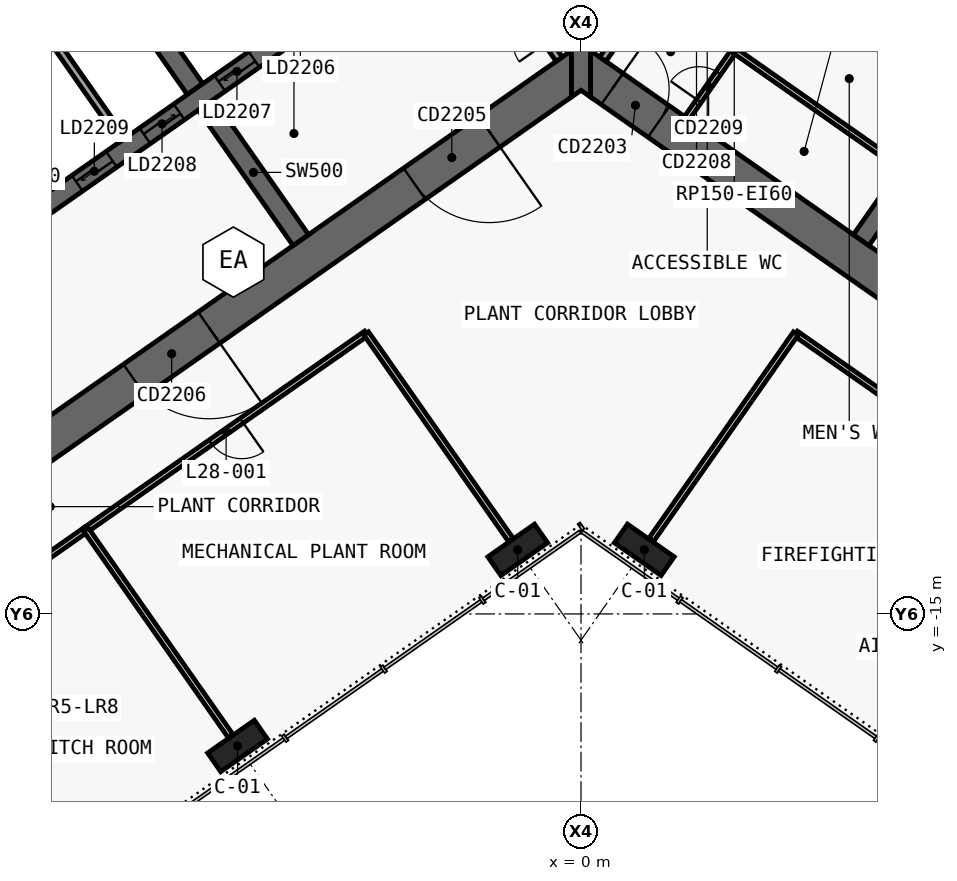
"""IFC4 building model, lengths in metres.
Left out: names, types, materials, properties, quantities, classifications, styles, units other than length and angle.
Written with IfcOpenShell. Run it as: python <this file> out.ifc"""

import sys

from ifc_helpers import new_model, si_unit, direction, frame, frame_2d, origin, origin_2d, place, context, subcontext, project, spatial, polyline, rectangle, outline, extrude, element, fill, save


model = new_model("IFC4")
c1 = context("Model", 3, precision=1e-05, world=origin(), true_north=direction((0.0, 1.0)))
c2 = subcontext(c1, "Body", "Model", "MODEL_VIEW")
j1 = project(units=[si_unit("LENGTHUNIT", "METRE"), si_unit("PLANEANGLEUNIT", "RADIAN")], contexts=[c1])
p1 = place(None, origin())
s1 = spatial("IfcSite", under=j1, at=p1, CompositionType="ELEMENT")
p2 = place(p1, origin())
s2 = spatial("IfcBuilding", under=s1, at=p2, CompositionType="ELEMENT")
p3 = place(p2, frame((0.0, 0.0, 126.5)))
s3 = spatial("IfcBuildingStorey", under=s2, at=p3, CompositionType="ELEMENT", Elevation=126.5)
p4 = place(p3, frame((0.037, 11.867, 0.0), z_axis=(0.0, 0.0, 1.0), x_axis=(-0.819155306259, -0.573571777746, 0.0)))
e1 = element("IfcWall", 1, at=p4, inside=s3, PredefinedType="SHEAR", context=c2, shape_type="SweptSolid", body=[
    extrude(outline(polyline([(33.837, 0.5), (0.7, 0.5), (0.0, -0.5), (33.837, -0.5), (33.837, 0.5)])), origin(), (0.0, 0.0, 1.0), 5.5),
])
p5 = place(p3, frame((0.037, -0.585, 0.0), z_axis=(0.0, 0.0, 1.0), x_axis=(-0.819157152511, -0.573569140985, 0.0)))
e2 = element("IfcWall", 2, at=p5, inside=s3, PredefinedType="SHEAR", context=c2, shape_type="SweptSolid", body=[
    extrude(outline(polyline([(26.695, 0.5), (0.7, 0.5), (0.0, -0.5), (26.695, -0.5), (26.695, 0.5)])), origin(), (0.0, 0.0, 1.0), 5.5),
])
p6 = place(p5, frame((2.995, 0.0, 0.0)))
e3 = element("IfcOpeningElement", 3, at=p6, cuts=e2, PredefinedType="OPENING", context=c2, shape_type="SweptSolid", body=[
    extrude(rectangle(XDim=2.4, YDim=2.1, at=frame_2d((1.2, 1.05))), frame((0.0, 0.51, 0.0), z_axis=(0.0, -1.0, 0.0), x_axis=(1.0, 0.0, 0.0)), (0.0, 0.0, 1.0), 1.02),
])
p7 = place(p5, frame((11.995, 0.0, 0.0)))
e4 = element("IfcOpeningElement", 4, at=p7, cuts=e2, PredefinedType="OPENING", context=c2, shape_type="SweptSolid", body=[
    extrude(rectangle(XDim=2.4, YDim=2.1, at=frame_2d((1.2, 1.05))), frame((0.0, 0.51, 0.0), z_axis=(0.0, -1.0, 0.0), x_axis=(1.0, 0.0, 0.0)), (0.0, 0.0, 1.0), 1.02),
])
p8 = place(p3, frame((-7.372, -5.162, 0.0), z_axis=(0.0, 0.0, 1.0), x_axis=(-0.573594173421, 0.819139624372, 0.0)))
e5 = element("IfcWall", 5, at=p8, inside=s3, PredefinedType="SHEAR", context=c2, shape_type="SweptSolid", body=[
    extrude(outline(polyline([(4.35, 0.25), (0.0, 0.25), (0.0, -0.25), (4.35, -0.25), (4.35, 0.25)])), origin(), (0.0, 0.0, 1.0), 5.5),
])
p9 = place(p3, frame((-10.154, -1.189, 0.0), z_axis=(0.0, 0.0, 1.0), x_axis=(-0.573594173421, 0.819139624372, 0.0)))
e6 = element("IfcWall", 6, at=p9, inside=s3, PredefinedType="SHEAR", context=c2, shape_type="SweptSolid", body=[
    extrude(outline(polyline([(4.35, -0.25), (4.35, 0.25), (-0.0, 0.25), (-0.0, -0.25), (4.35, -0.25)])), origin(), (0.0, 0.0, 1.0), 5.5),
])
p10 = place(p3, frame((-2.638, 3.768, 0.0), z_axis=(0.0, 0.0, 1.0), x_axis=(-0.819148977158, -0.573580816643, 0.0)))
e7 = element("IfcWall", 7, at=p10, inside=s3, PredefinedType="SHEAR", context=c2, shape_type="SweptSolid", body=[
    extrude(outline(polyline([(26.0, 0.25), (0.0, 0.25), (0.0, -0.25), (26.0, -0.25), (26.0, 0.25)])), origin(), (0.0, 0.0, 1.0), 5.5),
])
p11 = place(p10, frame((1.169, 0.0, 0.0)))
e8 = element("IfcOpeningElement", 8, at=p11, cuts=e7, PredefinedType="OPENING", context=c2, shape_type="SweptSolid", body=[
    extrude(rectangle(XDim=1.1, YDim=2.1, at=frame_2d((0.55, 1.05))), frame((0.0, 0.26, 0.0), z_axis=(0.0, -1.0, 0.0), x_axis=(1.0, 0.0, 0.0)), (0.0, 0.0, 1.0), 0.52),
])
p12 = place(p10, frame((3.206, 0.0, 0.0)))
e9 = element("IfcOpeningElement", 9, at=p12, cuts=e7, PredefinedType="OPENING", context=c2, shape_type="SweptSolid", body=[
    extrude(rectangle(XDim=1.1, YDim=2.1, at=frame_2d((0.55, 1.05))), frame((0.0, 0.26, 0.0), z_axis=(0.0, -1.0, 0.0), x_axis=(1.0, 0.0, 0.0)), (0.0, 0.0, 1.0), 0.52),
])
p13 = place(p10, frame((5.244, 0.0, 0.0)))
e10 = element("IfcOpeningElement", 10, at=p13, cuts=e7, PredefinedType="OPENING", context=c2, shape_type="SweptSolid", body=[
    extrude(rectangle(XDim=1.1, YDim=2.1, at=frame_2d((0.55, 1.05))), frame((0.0, 0.26, 0.0), z_axis=(0.0, -1.0, 0.0), x_axis=(1.0, 0.0, 0.0)), (0.0, 0.0, 1.0), 0.52),
])
p14 = place(p10, frame((7.281, 0.0, 0.0)))
e11 = element("IfcOpeningElement", 11, at=p14, cuts=e7, PredefinedType="OPENING", context=c2, shape_type="SweptSolid", body=[
    extrude(rectangle(XDim=1.1, YDim=2.1, at=frame_2d((0.55, 1.05))), frame((0.0, 0.26, 0.0), z_axis=(0.0, -1.0, 0.0), x_axis=(1.0, 0.0, 0.0)), (0.0, 0.0, 1.0), 0.52),
])
p15 = place(p10, frame((9.688, 0.0, 0.0)))
e12 = element("IfcOpeningElement", 12, at=p15, cuts=e7, PredefinedType="OPENING", context=c2, shape_type="SweptSolid", body=[
    extrude(rectangle(XDim=1.1, YDim=2.1, at=frame_2d((0.55, 1.05))), frame((0.0, 0.26, 0.0), z_axis=(0.0, -1.0, 0.0), x_axis=(1.0, 0.0, 0.0)), (0.0, 0.0, 1.0), 0.52),
])
p16 = place(p10, frame((11.863, 0.0, 0.0)))
e13 = element("IfcOpeningElement", 13, at=p16, cuts=e7, PredefinedType="OPENING", context=c2, shape_type="SweptSolid", body=[
    extrude(rectangle(XDim=1.1, YDim=2.1, at=frame_2d((0.55, 1.05))), frame((0.0, 0.26, 0.0), z_axis=(0.0, -1.0, 0.0), x_axis=(1.0, 0.0, 0.0)), (0.0, 0.0, 1.0), 0.52),
])
p17 = place(p10, frame((14.038, 0.0, 0.0)))
e14 = element("IfcOpeningElement", 14, at=p17, cuts=e7, PredefinedType="OPENING", context=c2, shape_type="SweptSolid", body=[
    extrude(rectangle(XDim=1.1, YDim=2.1, at=frame_2d((0.55, 1.05))), frame((0.0, 0.26, 0.0), z_axis=(0.0, -1.0, 0.0), x_axis=(1.0, 0.0, 0.0)), (0.0, 0.0, 1.0), 0.52),
])
p18 = place(p10, frame((16.212, 0.0, 0.0)))
e15 = element("IfcOpeningElement", 15, at=p18, cuts=e7, PredefinedType="OPENING", context=c2, shape_type="SweptSolid", body=[
    extrude(rectangle(XDim=1.1, YDim=2.1, at=frame_2d((0.55, 1.05))), frame((0.0, 0.26, 0.0), z_axis=(0.0, -1.0, 0.0), x_axis=(1.0, 0.0, 0.0)), (0.0, 0.0, 1.0), 0.52),
])
p19 = place(p3, frame((-0.037, 11.867, 0.0), z_axis=(0.0, 0.0, 1.0), x_axis=(0.819155306259, -0.573571777746, 0.0)))
e16 = element("IfcWall", 16, at=p19, inside=s3, PredefinedType="SHEAR", context=c2, shape_type="SweptSolid", body=[
    extrude(outline(polyline([(33.837, 0.5), (0.0, 0.5), (0.7, -0.5), (33.837, -0.5), (33.837, 0.5)])), origin(), (0.0, 0.0, 1.0), 5.5),
])
p20 = place(p3, frame((-0.037, -0.585, 0.0), z_axis=(0.0, 0.0, 1.0), x_axis=(0.819157152511, -0.573569140985, 0.0)))
e17 = element("IfcWall", 17, at=p20, inside=s3, PredefinedType="SHEAR", context=c2, shape_type="SweptSolid", body=[
    extrude(outline(polyline([(26.695, 0.5), (0.0, 0.5), (0.7, -0.5), (26.695, -0.5), (26.695, 0.5)])), origin(), (0.0, 0.0, 1.0), 5.5),
])
p21 = place(p20, frame((1.045, 0.0, 0.0)))
e18 = element("IfcOpeningElement", 18, at=p21, cuts=e17, PredefinedType="OPENING", context=c2, shape_type="SweptSolid", body=[
    extrude(rectangle(XDim=1.5, YDim=2.1, at=frame_2d((0.75, 1.05))), frame((0.0, 0.51, 0.0), z_axis=(0.0, -1.0, 0.0), x_axis=(1.0, 0.0, 0.0)), (0.0, 0.0, 1.0), 1.02),
])
p22 = place(p20, frame((12.445, 0.0, 0.0)))
e19 = element("IfcOpeningElement", 19, at=p22, cuts=e17, PredefinedType="OPENING", context=c2, shape_type="SweptSolid", body=[
    extrude(rectangle(XDim=1.5, YDim=2.1, at=frame_2d((0.75, 1.05))), frame((0.0, 0.51, 0.0), z_axis=(0.0, -1.0, 0.0), x_axis=(1.0, 0.0, 0.0)), (0.0, 0.0, 1.0), 1.02),
])
p23 = place(p3, frame((7.372, -5.162, 0.0), z_axis=(0.0, 0.0, 1.0), x_axis=(0.573594173421, 0.819139624372, 0.0)))
e20 = element("IfcWall", 20, at=p23, inside=s3, PredefinedType="SHEAR", context=c2, shape_type="SweptSolid", body=[
    extrude(outline(polyline([(0.0, 0.25), (0.0, -0.25), (4.35, -0.25), (4.35, 0.25), (0.0, 0.25)])), origin(), (0.0, 0.0, 1.0), 5.5),
])
p24 = place(p3, frame((2.638, 3.768, 0.0), z_axis=(0.0, 0.0, 1.0), x_axis=(0.819148977158, -0.573580816643, 0.0)))
e21 = element("IfcWall", 21, at=p24, inside=s3, PredefinedType="SHEAR", context=c2, shape_type="SweptSolid", body=[
    extrude(outline(polyline([(0.0, 0.25), (0.0, -0.25), (26.0, -0.25), (26.0, 0.25), (0.0, 0.25)])), origin(), (0.0, 0.0, 1.0), 5.5),
])
p25 = place(p24, frame((9.637, 0.0, 0.0)))
e22 = element("IfcOpeningElement", 22, at=p25, cuts=e21, PredefinedType="OPENING", context=c2, shape_type="SweptSolid", body=[
    extrude(rectangle(XDim=1.2, YDim=2.1, at=frame_2d((0.6, 1.05))), frame((0.0, 0.26, 0.0), z_axis=(0.0, -1.0, 0.0), x_axis=(1.0, 0.0, 0.0)), (0.0, 0.0, 1.0), 0.52),
])
p26 = place(p24, frame((11.812, 0.0, 0.0)))
e23 = element("IfcOpeningElement", 23, at=p26, cuts=e21, PredefinedType="OPENING", context=c2, shape_type="SweptSolid", body=[
    extrude(rectangle(XDim=1.2, YDim=2.1, at=frame_2d((0.6, 1.05))), frame((0.0, 0.26, 0.0), z_axis=(0.0, -1.0, 0.0), x_axis=(1.0, 0.0, 0.0)), (0.0, 0.0, 1.0), 0.52),
])
p27 = place(p24, frame((13.988, 0.0, 0.0)))
e24 = element("IfcOpeningElement", 24, at=p27, cuts=e21, PredefinedType="OPENING", context=c2, shape_type="SweptSolid", body=[
    extrude(rectangle(XDim=1.2, YDim=2.1, at=frame_2d((0.6, 1.05))), frame((0.0, 0.26, 0.0), z_axis=(0.0, -1.0, 0.0), x_axis=(1.0, 0.0, 0.0)), (0.0, 0.0, 1.0), 0.52),
])
p28 = place(p24, frame((16.262, 0.0, 0.0)))
e25 = element("IfcOpeningElement", 25, at=p28, cuts=e21, PredefinedType="OPENING", context=c2, shape_type="SweptSolid", body=[
    extrude(rectangle(XDim=1.0, YDim=2.1, at=frame_2d((0.5, 1.05))), frame((0.0, 0.26, 0.0), z_axis=(0.0, -1.0, 0.0), x_axis=(1.0, 0.0, 0.0)), (0.0, 0.0, 1.0), 0.52),
])
p29 = place(p3, frame((0.0, -1.396, 0.0), z_axis=(0.0, 0.0, 1.0), x_axis=(0.0, 1.0, 0.0)))
e26 = element("IfcWall", 26, at=p29, inside=s3, PredefinedType="SHEAR", context=c2, shape_type="SweptSolid", body=[
    extrude(outline(polyline([(0.0, -0.25), (0.175, -0.25), (1.221, -0.25), (12.452, -0.25), (13.848, -0.25), (13.857, -0.25), (13.968, -0.172), (13.848, 0.0), (13.968, 0.172), (13.857, 0.25), (13.848, 0.25), (12.452, 0.25), (1.221, 0.25), (0.175, 0.25), (0.0, 0.25), (0.175, 0.0), (0.0, -0.25)])), origin(), (0.0, 0.0, 1.0), 5.5),
])
for number, where, z_axis, x_axis in (
    (27, (-1.665, -13.313, 0.0), (0.0, 0.0, 1.0), (-0.819, -0.574, 0.0)),
    (28, (-9.038, -18.475, 0.0), (0.0, 0.0, 1.0), (-0.819, -0.574, 0.0)),
    (29, (1.665, -13.313, 0.0), (0.0, 0.0, 1.0), (0.819, -0.574, 0.0)),
):
    element("IfcColumn", number, at=place(p3, frame(where, z_axis=z_axis, x_axis=x_axis)), inside=s3, PredefinedType="COLUMN", context=c2, shape_type="SweptSolid", body=[
        extrude(rectangle(XDim=1.5, YDim=0.6, at=origin_2d()), origin(), (0.0, 0.0, 1.0), 5.5),
    ])
p30 = place(p3, frame((-12.059, -2.523, 0.0), z_axis=(0.0, 0.0, 1.0), x_axis=(-0.573594173421, 0.819139624372, 0.0)))
e30 = element("IfcWall", 30, at=p30, inside=s3, PredefinedType="SOLIDWALL", context=c2, shape_type="SweptSolid", body=[
    extrude(rectangle(XDim=4.35, YDim=0.2, at=frame_2d((2.175, 0.0))), origin(), (0.0, 0.0, 1.0), 5.5),
])
p31 = place(p3, frame((-13.84, -3.771, 0.0), z_axis=(0.0, 0.0, 1.0), x_axis=(-0.57356780395, 0.819158088694, 0.0)))
e31 = element("IfcWall", 31, at=p31, inside=s3, PredefinedType="SOLIDWALL", context=c2, shape_type="SweptSolid", body=[
    extrude(rectangle(XDim=4.35, YDim=0.2, at=frame_2d((2.175, 0.0))), origin(), (0.0, 0.0, 1.0), 5.5),
])
p32 = place(p3, frame((2.785, -1.95, 0.0), z_axis=(0.0, 0.0, 1.0), x_axis=(0.57356780395, 0.819158088694, 0.0)))
e32 = element("IfcWall", 32, at=p32, inside=s3, PredefinedType="PARTITIONING", context=c2, shape_type="SweptSolid", body=[
    extrude(rectangle(XDim=4.35, YDim=0.15, at=frame_2d((2.175, 0.0))), origin(), (0.0, 0.0, 1.0), 5.22),
])
p33 = place(p32, frame((0.55, 0.0, 0.0)))
e33 = element("IfcOpeningElement", 33, at=p33, cuts=e32, PredefinedType="OPENING", context=c2, shape_type="SweptSolid", body=[
    extrude(rectangle(XDim=0.9, YDim=2.1, at=frame_2d((0.45, 1.05))), frame((0.0, 0.085, 0.0), z_axis=(0.0, -1.0, 0.0), x_axis=(1.0, 0.0, 0.0)), (0.0, 0.0, 1.0), 0.17),
])
p34 = place(p32, frame((2.825, 0.0, 0.0)))
e34 = element("IfcOpeningElement", 34, at=p34, cuts=e32, PredefinedType="OPENING", context=c2, shape_type="SweptSolid", body=[
    extrude(rectangle(XDim=0.9, YDim=2.1, at=frame_2d((0.45, 1.05))), frame((0.0, 0.085, 0.0), z_axis=(0.0, -1.0, 0.0), x_axis=(1.0, 0.0, 0.0)), (0.0, 0.0, 1.0), 0.17),
])
p35 = place(p3, frame((4.033, -0.168, 0.0), z_axis=(0.0, 0.0, 1.0), x_axis=(0.819146154531, -0.573584847705, 0.0)))
e35 = element("IfcWall", 35, at=p35, inside=s3, PredefinedType="PARTITIONING", context=c2, shape_type="SweptSolid", body=[
    extrude(rectangle(XDim=5.35, YDim=0.15, at=frame_2d((2.675, 0.0))), origin(), (0.0, 0.0, 1.0), 5.22),
])
p36 = place(p3, frame((-0.573, -0.402, 0.0), z_axis=(0.0, 0.0, 1.0), x_axis=(-0.57356780395, 0.819158088694, 0.0)))
e36 = element("IfcWall", 36, at=p36, inside=s3, PredefinedType="SOLIDWALL", context=c2, shape_type="SweptSolid", body=[
    extrude(rectangle(XDim=4.35, YDim=0.2, at=frame_2d((2.175, 0.0))), origin(), (0.0, 0.0, 1.0), 5.22),
])
p37 = place(p36, frame((0.55, 0.0, 0.0)))
e37 = element("IfcOpeningElement", 37, at=p37, cuts=e36, PredefinedType="OPENING", context=c2, shape_type="SweptSolid", body=[
    extrude(rectangle(XDim=0.9, YDim=2.1, at=frame_2d((0.45, 1.05))), frame((0.0, 0.11, 0.0), z_axis=(0.0, -1.0, 0.0), x_axis=(1.0, 0.0, 0.0)), (0.0, 0.0, 1.0), 0.22),
])
p38 = place(p3, frame((0.573, -0.402, 0.0), z_axis=(0.0, 0.0, 1.0), x_axis=(0.57356780395, 0.819158088694, 0.0)))
e38 = element("IfcWall", 38, at=p38, inside=s3, PredefinedType="SOLIDWALL", context=c2, shape_type="SweptSolid", body=[
    extrude(rectangle(XDim=4.35, YDim=0.2, at=frame_2d((2.175, 0.0))), origin(), (0.0, 0.0, 1.0), 5.22),
])
p39 = place(p38, frame((0.55, 0.0, 0.0)))
e39 = element("IfcOpeningElement", 39, at=p39, cuts=e38, PredefinedType="OPENING", context=c2, shape_type="SweptSolid", body=[
    extrude(rectangle(XDim=0.9, YDim=2.1, at=frame_2d((0.45, 1.05))), frame((0.0, 0.11, 0.0), z_axis=(0.0, -1.0, 0.0), x_axis=(1.0, 0.0, 0.0)), (0.0, 0.0, 1.0), 0.22),
])
p40 = place(p3, frame((20.398, -17.945, 0.0), z_axis=(0.0, 0.0, 1.0), x_axis=(-0.81916437852, 0.57355882084, 0.0)))
e40 = element("IfcWall", 40, at=p40, inside=s3, PredefinedType="PARTITIONING", context=c2, shape_type="SweptSolid", body=[
    extrude(rectangle(XDim=18.002, YDim=0.15, at=frame_2d((9.001, 0.0))), origin(), (0.0, 0.0, 1.0), 4.6),
])
p41 = place(p40, frame((10.201, 0.0, 0.0)))
e41 = element("IfcOpeningElement", 41, at=p41, cuts=e40, PredefinedType="OPENING", context=c2, shape_type="SweptSolid", body=[
    extrude(rectangle(XDim=1.0, YDim=2.1, at=frame_2d((0.5, 1.05))), frame((0.0, 0.085, 0.0), z_axis=(0.0, -1.0, 0.0), x_axis=(1.0, 0.0, 0.0)), (0.0, 0.0, 1.0), 0.17),
])
p42 = place(p3, frame((-5.652, -7.62, 0.0), z_axis=(0.0, 0.0, 1.0), x_axis=(-0.81915291695, -0.57357519006, 0.0)))
e42 = element("IfcWall", 42, at=p42, inside=s3, PredefinedType="PARTITIONING", context=c2, shape_type="SweptSolid", body=[
    extrude(rectangle(XDim=9.002, YDim=0.15, at=frame_2d((4.501, 0.0))), origin(), (0.0, 0.0, 1.0), 4.6),
])
p43 = place(p42, frame((4.001, 0.0, 0.0)))
e43 = element("IfcOpeningElement", 43, at=p43, cuts=e42, PredefinedType="OPENING", context=c2, shape_type="SweptSolid", body=[
    extrude(rectangle(XDim=1.0, YDim=2.1, at=frame_2d((0.5, 1.05))), frame((0.0, 0.085, 0.0), z_axis=(0.0, -1.0, 0.0), x_axis=(1.0, 0.0, 0.0)), (0.0, 0.0, 1.0), 0.17),
])
p44 = place(p3, frame((-13.022, -12.781, 0.0), z_axis=(0.0, 0.0, 1.0), x_axis=(-0.819142740634, -0.573589723117, 0.0)))
e44 = element("IfcWall", 44, at=p44, inside=s3, PredefinedType="PARTITIONING", context=c2, shape_type="SweptSolid", body=[
    extrude(rectangle(XDim=9.004, YDim=0.15, at=frame_2d((4.502, 0.0))), origin(), (0.0, 0.0, 1.0), 4.6),
])
p45 = place(p44, frame((4.002, 0.0, 0.0)))
e45 = element("IfcOpeningElement", 45, at=p45, cuts=e44, PredefinedType="OPENING", context=c2, shape_type="SweptSolid", body=[
    extrude(rectangle(XDim=1.0, YDim=2.1, at=frame_2d((0.5, 1.05))), frame((0.0, 0.085, 0.0), z_axis=(0.0, -1.0, 0.0), x_axis=(1.0, 0.0, 0.0)), (0.0, 0.0, 1.0), 0.17),
])
p46 = place(p3, frame((1.849, -13.051, 0.0), z_axis=(0.0, 0.0, 1.0), x_axis=(0.57357355307, 0.819154063177, 0.0)))
e46 = element("IfcWall", 46, at=p46, inside=s3, PredefinedType="PARTITIONING", context=c2, shape_type="SweptSolid", body=[
    extrude(rectangle(XDim=6.63, YDim=0.15, at=frame_2d((3.315, 0.0))), origin(), (0.0, 0.0, 1.0), 4.6),
])
p47 = place(p3, frame((-1.849, -13.051, 0.0), z_axis=(0.0, 0.0, 1.0), x_axis=(-0.573575988258, 0.819152358047, 0.0)))
e47 = element("IfcWall", 47, at=p47, inside=s3, PredefinedType="PARTITIONING", context=c2, shape_type="SweptSolid", body=[
    extrude(rectangle(XDim=6.632, YDim=0.15, at=frame_2d((3.316, 0.0))), origin(), (0.0, 0.0, 1.0), 4.6),
])
p48 = place(p3, frame((-9.221, -18.213, 0.0), z_axis=(0.0, 0.0, 1.0), x_axis=(-0.573556251799, 0.819166177294, 0.0)))
e48 = element("IfcWall", 48, at=p48, inside=s3, PredefinedType="PARTITIONING", context=c2, shape_type="SweptSolid", body=[
    extrude(rectangle(XDim=6.63, YDim=0.15, at=frame_2d((3.315, 0.0))), origin(), (0.0, 0.0, 1.0), 4.6),
])
p49 = place(p14, origin())
e49 = element("IfcDoor", 49, at=p49, inside=s3, OperationType="SLIDING_TO_RIGHT", PredefinedType="DOOR", context=c2, shape_type="SweptSolid", body=[
    extrude(rectangle(XDim=1.1, YDim=2.1, at=frame_2d((0.55, 1.05))), frame((0.0, 0.025, 0.0), z_axis=(0.0, -1.0, 0.0), x_axis=(1.0, 0.0, 0.0)), (0.0, 0.0, 1.0), 0.05),
])
fill(e11, e49)
p50 = place(p15, origin())
e50 = element("IfcDoor", 50, at=p50, inside=s3, OperationType="SLIDING_TO_LEFT", PredefinedType="DOOR", context=c2, shape_type="SweptSolid", body=[
    extrude(rectangle(XDim=1.1, YDim=2.1, at=frame_2d((0.55, 1.05))), frame((0.0, 0.025, 0.0), z_axis=(0.0, -1.0, 0.0), x_axis=(1.0, 0.0, 0.0)), (0.0, 0.0, 1.0), 0.05),
])
fill(e12, e50)
p51 = place(p16, origin())
e51 = element("IfcDoor", 51, at=p51, inside=s3, OperationType="SLIDING_TO_RIGHT", PredefinedType="DOOR", context=c2, shape_type="SweptSolid", body=[
    extrude(rectangle(XDim=1.1, YDim=2.1, at=frame_2d((0.55, 1.05))), frame((0.0, 0.025, 0.0), z_axis=(0.0, -1.0, 0.0), x_axis=(1.0, 0.0, 0.0)), (0.0, 0.0, 1.0), 0.05),
])
fill(e13, e51)
p52 = place(p6, origin())
e52 = element("IfcDoor", 52, at=p52, inside=s3, OperationType="DOUBLE_DOOR_SINGLE_SWING", PredefinedType="DOOR", context=c2, shape_type="SweptSolid", body=[
    extrude(rectangle(XDim=2.4, YDim=2.1, at=frame_2d((1.2, 1.05))), frame((0.0, 0.025, 0.0), z_axis=(0.0, -1.0, 0.0), x_axis=(1.0, 0.0, 0.0)), (0.0, 0.0, 1.0), 0.05),
])
fill(e3, e52)
p53 = place(p7, origin())
e53 = element("IfcDoor", 53, at=p53, inside=s3, OperationType="DOUBLE_DOOR_SINGLE_SWING", PredefinedType="DOOR", context=c2, shape_type="SweptSolid", body=[
    extrude(rectangle(XDim=2.4, YDim=2.1, at=frame_2d((1.2, 1.05))), frame((0.0, 0.025, 0.0), z_axis=(0.0, -1.0, 0.0), x_axis=(1.0, 0.0, 0.0)), (0.0, 0.0, 1.0), 0.05),
])
fill(e4, e53)
p54 = place(p33, origin())
e54 = element("IfcDoor", 54, at=p54, inside=s3, OperationType="SINGLE_SWING_RIGHT", PredefinedType="DOOR", context=c2, shape_type="SweptSolid", body=[
    extrude(rectangle(XDim=0.9, YDim=2.1, at=frame_2d((0.45, 1.05))), frame((0.0, 0.025, 0.0), z_axis=(0.0, -1.0, 0.0), x_axis=(1.0, 0.0, 0.0)), (0.0, 0.0, 1.0), 0.05),
])
fill(e33, e54)
p55 = place(p21, origin())
e55 = element("IfcDoor", 55, at=p55, inside=s3, OperationType="SINGLE_SWING_RIGHT", PredefinedType="DOOR", context=c2, shape_type="SweptSolid", body=[
    extrude(rectangle(XDim=1.5, YDim=2.1, at=frame_2d((0.75, 1.05))), frame((0.0, 0.025, 0.0), z_axis=(0.0, -1.0, 0.0), x_axis=(1.0, 0.0, 0.0)), (0.0, 0.0, 1.0), 0.05),
])
fill(e18, e55)
p56 = place(p43, origin())
e56 = element("IfcDoor", 56, at=p56, inside=s3, OperationType="SINGLE_SWING_RIGHT", PredefinedType="DOOR", context=c2, shape_type="SweptSolid", body=[
    extrude(rectangle(XDim=1.0, YDim=2.1, at=frame_2d((0.5, 1.05))), frame((0.0, 0.025, 0.0), z_axis=(0.0, -1.0, 0.0), x_axis=(1.0, 0.0, 0.0)), (0.0, 0.0, 1.0), 0.05),
])
fill(e43, e56)
save(model, sys.argv[1])
